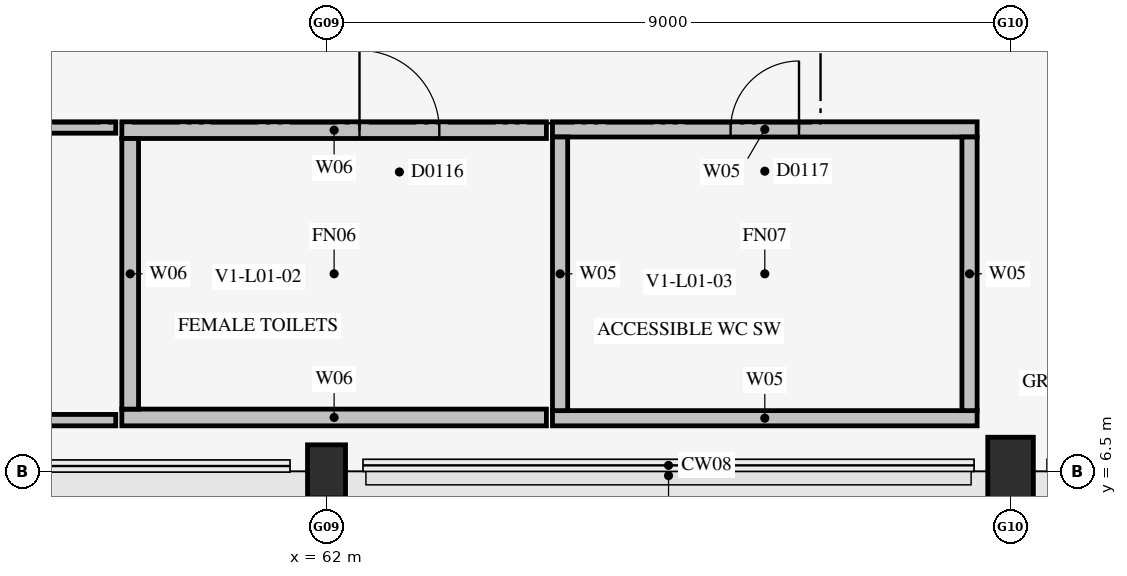
"""IFC4 building model, lengths in metres.
Left out: names, types, materials, properties, quantities, classifications, styles, units other than length and angle.
Written with IfcOpenShell. Run it as: python <this file> out.ifc"""

import sys

from ifc_helpers import new_model, si_unit, direction, frame, frame_2d, origin, origin_2d, place, context, subcontext, project, spatial, rectangle, extrude, element, fill, save


model = new_model("IFC4")
c1 = context("Model", 3, precision=1e-05, world=origin(), true_north=direction((0.0, 1.0)))
c2 = subcontext(c1, "Body", "Model", "MODEL_VIEW")
j1 = project(units=[si_unit("LENGTHUNIT", "METRE"), si_unit("PLANEANGLEUNIT", "RADIAN")], contexts=[c1])
p1 = place(None, origin())
s1 = spatial("IfcSite", under=j1, at=p1, CompositionType="ELEMENT")
p2 = place(p1, origin())
s2 = spatial("IfcBuilding", under=s1, at=p2, CompositionType="ELEMENT")
p3 = place(p2, frame((0.0, 0.0, 5.4)))
s3 = spatial("IfcBuildingStorey", under=s2, at=p3, CompositionType="ELEMENT", Elevation=5.4)
p4 = place(p3, frame((62.0, 6.5, 0.0), z_axis=(0.0, 0.0, 1.0), x_axis=(1.0, 0.0, 0.0)))
e1 = element("IfcColumn", 1, at=p4, inside=s3, PredefinedType="COLUMN", context=c2, shape_type="SweptSolid", body=[
    extrude(rectangle(XDim=0.5, YDim=0.7, at=origin_2d()), origin(), (0.0, 0.0, 1.0), 4.48),
])
p5 = place(p3, frame((71.0, 6.5, 0.0), z_axis=(0.0, 0.0, 1.0), x_axis=(1.0, 0.0, 0.0)))
e2 = element("IfcColumn", 2, at=p5, inside=s3, PredefinedType="COLUMN", context=c2, shape_type="SweptSolid", body=[
    extrude(rectangle(XDim=0.6, YDim=0.9, at=origin_2d()), origin(), (0.0, 0.0, 1.0), 4.48),
])
p6 = place(p3, frame((53.64, 7.175, 0.0), z_axis=(0.0, 0.0, 1.0), x_axis=(1.0, 0.0, 0.0)))
e3 = element("IfcWall", 3, at=p6, inside=s3, PredefinedType="PARTITIONING", context=c2, shape_type="SweptSolid", body=[
    extrude(rectangle(XDim=5.587, YDim=0.15, at=frame_2d((2.793, 0.0))), origin(), (0.0, 0.0, 1.0), 4.465),
])
p7 = place(p3, frame((53.64, 11.025, 0.0), z_axis=(0.0, 0.0, 1.0), x_axis=(1.0, 0.0, 0.0)))
e4 = element("IfcWall", 4, at=p7, inside=s3, PredefinedType="PARTITIONING", context=c2, shape_type="SweptSolid", body=[
    extrude(rectangle(XDim=5.587, YDim=0.15, at=frame_2d((2.793, 0.0))), origin(), (0.0, 0.0, 1.0), 4.465),
])
p8 = place(p7, frame((3.09, 0.0, 0.0)))
e5 = element("IfcOpeningElement", 5, at=p8, cuts=e4, PredefinedType="OPENING", context=c2, shape_type="SweptSolid", body=[
    extrude(rectangle(XDim=1.1, YDim=2.25, at=frame_2d((0.55, 1.125))), frame((0.0, 0.087, 0.0), z_axis=(0.0, -1.0, 0.0), x_axis=(1.0, 0.0, 0.0)), (0.0, 0.0, 1.0), 0.174),
])
p9 = place(p3, frame((59.307, 7.21, 0.0), z_axis=(0.0, 0.0, 1.0), x_axis=(1.0, 0.0, 0.0)))
e6 = element("IfcWall", 6, at=p9, inside=s3, PredefinedType="PLUMBINGWALL", context=c2, shape_type="SweptSolid", body=[
    extrude(rectangle(XDim=5.586, YDim=0.22, at=frame_2d((2.793, 0.0))), origin(), (0.0, 0.0, 1.0), 4.465),
])
p10 = place(p3, frame((59.307, 10.99, 0.0), z_axis=(0.0, 0.0, 1.0), x_axis=(1.0, 0.0, 0.0)))
e7 = element("IfcWall", 7, at=p10, inside=s3, PredefinedType="PLUMBINGWALL", context=c2, shape_type="SweptSolid", body=[
    extrude(rectangle(XDim=5.586, YDim=0.22, at=frame_2d((2.793, 0.0))), origin(), (0.0, 0.0, 1.0), 4.465),
])
p11 = place(p10, frame((3.127, 0.0, 0.0)))
e8 = element("IfcOpeningElement", 8, at=p11, cuts=e7, PredefinedType="OPENING", context=c2, shape_type="SweptSolid", body=[
    extrude(rectangle(XDim=1.05, YDim=2.15, at=frame_2d((0.525, 1.075))), frame((0.0, 0.122, 0.0), z_axis=(0.0, -1.0, 0.0), x_axis=(1.0, 0.0, 0.0)), (0.0, 0.0, 1.0), 0.244),
])
p12 = place(p3, frame((59.417, 7.32, 0.0), z_axis=(0.0, 0.0, 1.0), x_axis=(0.0, 1.0, 0.0)))
e9 = element("IfcWall", 9, at=p12, inside=s3, PredefinedType="PLUMBINGWALL", context=c2, shape_type="SweptSolid", body=[
    extrude(rectangle(XDim=3.56, YDim=0.22, at=frame_2d((1.78, 0.0))), origin(), (0.0, 0.0, 1.0), 4.465),
])
p13 = place(p3, frame((64.973, 7.2, 0.0), z_axis=(0.0, 0.0, 1.0), x_axis=(1.0, 0.0, 0.0)))
e10 = element("IfcWall", 10, at=p13, inside=s3, PredefinedType="PLUMBINGWALL", context=c2, shape_type="SweptSolid", body=[
    extrude(rectangle(XDim=5.587, YDim=0.2, at=frame_2d((2.793, 0.0))), origin(), (0.0, 0.0, 1.0), 4.465),
])
p14 = place(p3, frame((64.973, 11.0, 0.0), z_axis=(0.0, 0.0, 1.0), x_axis=(1.0, 0.0, 0.0)))
e11 = element("IfcWall", 11, at=p14, inside=s3, PredefinedType="PLUMBINGWALL", context=c2, shape_type="SweptSolid", body=[
    extrude(rectangle(XDim=5.587, YDim=0.2, at=frame_2d((2.793, 0.0))), origin(), (0.0, 0.0, 1.0), 4.465),
])
p15 = place(p14, frame((2.344, 0.0, 0.0)))
e12 = element("IfcOpeningElement", 12, at=p15, cuts=e11, PredefinedType="OPENING", context=c2, shape_type="SweptSolid", body=[
    extrude(rectangle(XDim=0.9, YDim=2.1, at=frame_2d((0.45, 1.05))), frame((0.0, 0.112, 0.0), z_axis=(0.0, -1.0, 0.0), x_axis=(1.0, 0.0, 0.0)), (0.0, 0.0, 1.0), 0.224),
])
p16 = place(p3, frame((70.46, 7.3, 0.0), z_axis=(0.0, 0.0, 1.0), x_axis=(0.0, 1.0, 0.0)))
e13 = element("IfcWall", 13, at=p16, inside=s3, PredefinedType="PLUMBINGWALL", context=c2, shape_type="SweptSolid", body=[
    extrude(rectangle(XDim=3.6, YDim=0.2, at=frame_2d((1.8, 0.0))), origin(), (0.0, 0.0, 1.0), 4.465),
])
p17 = place(p3, frame((65.073, 7.3, 0.0), z_axis=(0.0, 0.0, 1.0), x_axis=(0.0, 1.0, 0.0)))
e14 = element("IfcWall", 14, at=p17, inside=s3, PredefinedType="PLUMBINGWALL", context=c2, shape_type="SweptSolid", body=[
    extrude(rectangle(XDim=3.6, YDim=0.2, at=frame_2d((1.8, 0.0))), origin(), (0.0, 0.0, 1.0), 4.092),
])
p18 = place(p11, frame((1.05, 0.0, 0.0), z_axis=(0.0, 0.0, 1.0), x_axis=(-1.0, 0.0, 0.0)))
e15 = element("IfcDoor", 15, at=p18, inside=s3, OperationType="SINGLE_SWING_LEFT", PredefinedType="DOOR", context=c2, shape_type="SweptSolid", body=[
    extrude(rectangle(XDim=1.05, YDim=2.15, at=frame_2d((0.525, 1.075))), frame((0.0, 0.025, 0.0), z_axis=(0.0, -1.0, 0.0), x_axis=(1.0, 0.0, 0.0)), (0.0, 0.0, 1.0), 0.05),
])
fill(e8, e15)
p19 = place(p15, frame((0.9, 0.0, 0.0), z_axis=(0.0, 0.0, 1.0), x_axis=(-1.0, 0.0, 0.0)))
e16 = element("IfcDoor", 16, at=p19, inside=s3, OperationType="SINGLE_SWING_RIGHT", PredefinedType="DOOR", context=c2, shape_type="SweptSolid", body=[
    extrude(rectangle(XDim=0.9, YDim=2.1, at=frame_2d((0.45, 1.05))), frame((0.0, 0.025, 0.0), z_axis=(0.0, -1.0, 0.0), x_axis=(1.0, 0.0, 0.0)), (0.0, 0.0, 1.0), 0.05),
])
fill(e12, e16)
save(model, sys.argv[1])
